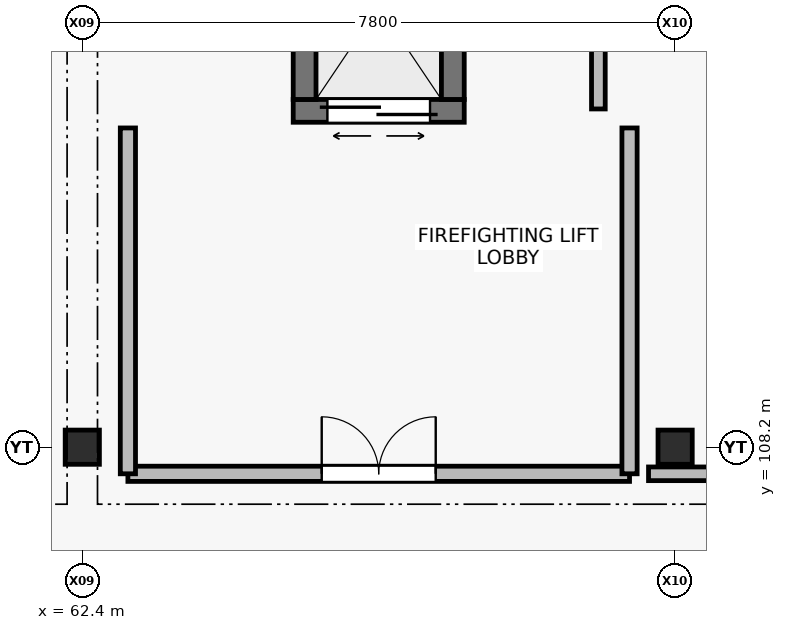
"""IFC4 building model, lengths in metres.
Left out: names, types, materials, properties, quantities, classifications, styles, units other than length and angle.
Written with IfcOpenShell. Run it as: python <this file> out.ifc"""

import sys

from ifc_helpers import new_model, si_unit, direction, frame, frame_2d, origin, origin_2d, place, context, subcontext, project, spatial, rectangle, extrude, element, fill, save


model = new_model("IFC4")
c1 = context("Model", 3, precision=1e-05, world=origin(), true_north=direction((0.0, 1.0)))
c2 = subcontext(c1, "Body", "Model", "MODEL_VIEW")
j1 = project(units=[si_unit("LENGTHUNIT", "METRE"), si_unit("PLANEANGLEUNIT", "RADIAN")], contexts=[c1])
p1 = place(None, origin())
s1 = spatial("IfcSite", under=j1, at=p1, CompositionType="ELEMENT")
p2 = place(p1, origin())
s2 = spatial("IfcBuilding", under=s1, at=p2, CompositionType="ELEMENT")
p3 = place(p2, frame((0.0, 0.0, 18.6)))
s3 = spatial("IfcBuildingStorey", under=s2, at=p3, CompositionType="ELEMENT", Elevation=18.6)
for number, where, z_axis, x_axis in (
    (1, (62.4, 108.2, 0.0), (0.0, 0.0, 1.0), (1.0, 0.0, 0.0)),
    (2, (70.2, 108.2, 0.0), (0.0, 0.0, 1.0), (1.0, 0.0, 0.0)),
):
    element("IfcColumn", number, at=place(p3, frame(where, z_axis=z_axis, x_axis=x_axis)), inside=s3, PredefinedType="COLUMN", context=c2, shape_type="SweptSolid", body=[
        extrude(rectangle(XDim=0.45, YDim=0.45, at=origin_2d()), origin(), (0.0, 0.0, 1.0), 4.5),
    ])
p4 = place(p3, frame((65.175, 112.625, 0.0), z_axis=(0.0, 0.0, 1.0), x_axis=(1.0, 0.0, 0.0)))
e3 = element("IfcWall", 3, at=p4, inside=s3, PredefinedType="SHEAR", context=c2, shape_type="SweptSolid", body=[
    extrude(rectangle(XDim=2.25, YDim=0.3, at=frame_2d((1.125, 0.0))), origin(), (0.0, 0.0, 1.0), 4.26),
])
p5 = place(p4, frame((0.45, 0.0, 0.0)))
e4 = element("IfcOpeningElement", 4, at=p5, cuts=e3, PredefinedType="OPENING", context=c2, shape_type="SweptSolid", body=[
    extrude(rectangle(XDim=1.35, YDim=2.3, at=frame_2d((0.675, 1.15))), frame((0.0, 0.16, 0.0), z_axis=(0.0, -1.0, 0.0), x_axis=(1.0, 0.0, 0.0)), (0.0, 0.0, 1.0), 0.32),
])
for number, where, z_axis, x_axis in (
    (5, (65.325, 115.225, 0.0), (0.0, 0.0, 1.0), (0.0, -1.0, 0.0)),
    (6, (67.275, 112.775, 0.0), (0.0, 0.0, 1.0), (0.0, 1.0, 0.0)),
):
    element("IfcWall", number, at=place(p3, frame(where, z_axis=z_axis, x_axis=x_axis)), inside=s3, PredefinedType="SHEAR", context=c2, shape_type="SweptSolid", body=[
        extrude(rectangle(XDim=2.45, YDim=0.3, at=frame_2d((1.225, 0.0))), origin(), (0.0, 0.0, 1.0), 4.26),
    ])
p6 = place(p3, frame((63.0, 107.85, 0.0), z_axis=(0.0, 0.0, 1.0), x_axis=(1.0, 0.0, 0.0)))
e7 = element("IfcWall", 7, at=p6, inside=s3, PredefinedType="SOLIDWALL", context=c2, shape_type="SweptSolid", body=[
    extrude(rectangle(XDim=6.6, YDim=0.2, at=frame_2d((3.3, 0.0))), origin(), (0.0, 0.0, 1.0), 3.72),
])
p7 = place(p6, frame((2.55, 0.0, 0.0)))
e8 = element("IfcOpeningElement", 8, at=p7, cuts=e7, PredefinedType="OPENING", context=c2, shape_type="SweptSolid", body=[
    extrude(rectangle(XDim=1.5, YDim=2.2, at=frame_2d((0.75, 1.1))), frame((0.0, 0.11, 0.0), z_axis=(0.0, -1.0, 0.0), x_axis=(1.0, 0.0, 0.0)), (0.0, 0.0, 1.0), 0.22),
])
for number, where, z_axis, x_axis in (
    (9, (63.0, 112.4, 0.0), (0.0, 0.0, 1.0), (0.0, -1.0, 0.0)),
    (10, (69.6, 107.85, 0.0), (0.0, 0.0, 1.0), (0.0, 1.0, 0.0)),
):
    element("IfcWall", number, at=place(p3, frame(where, z_axis=z_axis, x_axis=x_axis)), inside=s3, PredefinedType="SOLIDWALL", context=c2, shape_type="SweptSolid", body=[
        extrude(rectangle(XDim=4.55, YDim=0.2, at=frame_2d((2.275, 0.0))), origin(), (0.0, 0.0, 1.0), 4.26),
    ])
p8 = place(p3, frame((69.85, 107.85, 0.0), z_axis=(0.0, 0.0, 1.0), x_axis=(1.0, 0.0, 0.0)))
e11 = element("IfcWall", 11, at=p8, inside=s3, PredefinedType="PARTITIONING", context=c2, shape_type="SweptSolid", body=[
    extrude(rectangle(XDim=3.19, YDim=0.18, at=frame_2d((1.595, 0.0))), origin(), (0.0, 0.0, 1.0), 3.72),
])
p9 = place(p8, frame((1.09, 0.0, 0.0)))
e12 = element("IfcOpeningElement", 12, at=p9, cuts=e11, PredefinedType="OPENING", context=c2, shape_type="SweptSolid", body=[
    extrude(rectangle(XDim=1.0, YDim=2.1, at=frame_2d((0.5, 1.05))), frame((0.0, 0.1, 0.0), z_axis=(0.0, -1.0, 0.0), x_axis=(1.0, 0.0, 0.0)), (0.0, 0.0, 1.0), 0.2),
])
p10 = place(p3, frame((69.19, 112.65, 0.0), z_axis=(0.0, 0.0, 1.0), x_axis=(0.0, 1.0, 0.0)))
e13 = element("IfcWall", 13, at=p10, inside=s3, PredefinedType="PARTITIONING", context=c2, shape_type="SweptSolid", body=[
    extrude(rectangle(XDim=3.16, YDim=0.18, at=frame_2d((1.58, 0.0))), origin(), (0.0, 0.0, 1.0), 4.26),
])
p11 = place(p5, origin())
e14 = element("IfcDoor", 14, at=p11, inside=s3, OperationType="DOUBLE_DOOR_SLIDING", PredefinedType="DOOR", context=c2, shape_type="SweptSolid", body=[
    extrude(rectangle(XDim=1.35, YDim=2.3, at=frame_2d((0.675, 1.15))), frame((0.0, 0.025, 0.0), z_axis=(0.0, -1.0, 0.0), x_axis=(1.0, 0.0, 0.0)), (0.0, 0.0, 1.0), 0.05),
])
fill(e4, e14)
p12 = place(p7, origin())
e15 = element("IfcDoor", 15, at=p12, inside=s3, OperationType="DOUBLE_DOOR_SINGLE_SWING", PredefinedType="DOOR", context=c2, shape_type="SweptSolid", body=[
    extrude(rectangle(XDim=1.5, YDim=2.2, at=frame_2d((0.75, 1.1))), frame((0.0, 0.025, 0.0), z_axis=(0.0, -1.0, 0.0), x_axis=(1.0, 0.0, 0.0)), (0.0, 0.0, 1.0), 0.05),
])
fill(e8, e15)
save(model, sys.argv[1])
